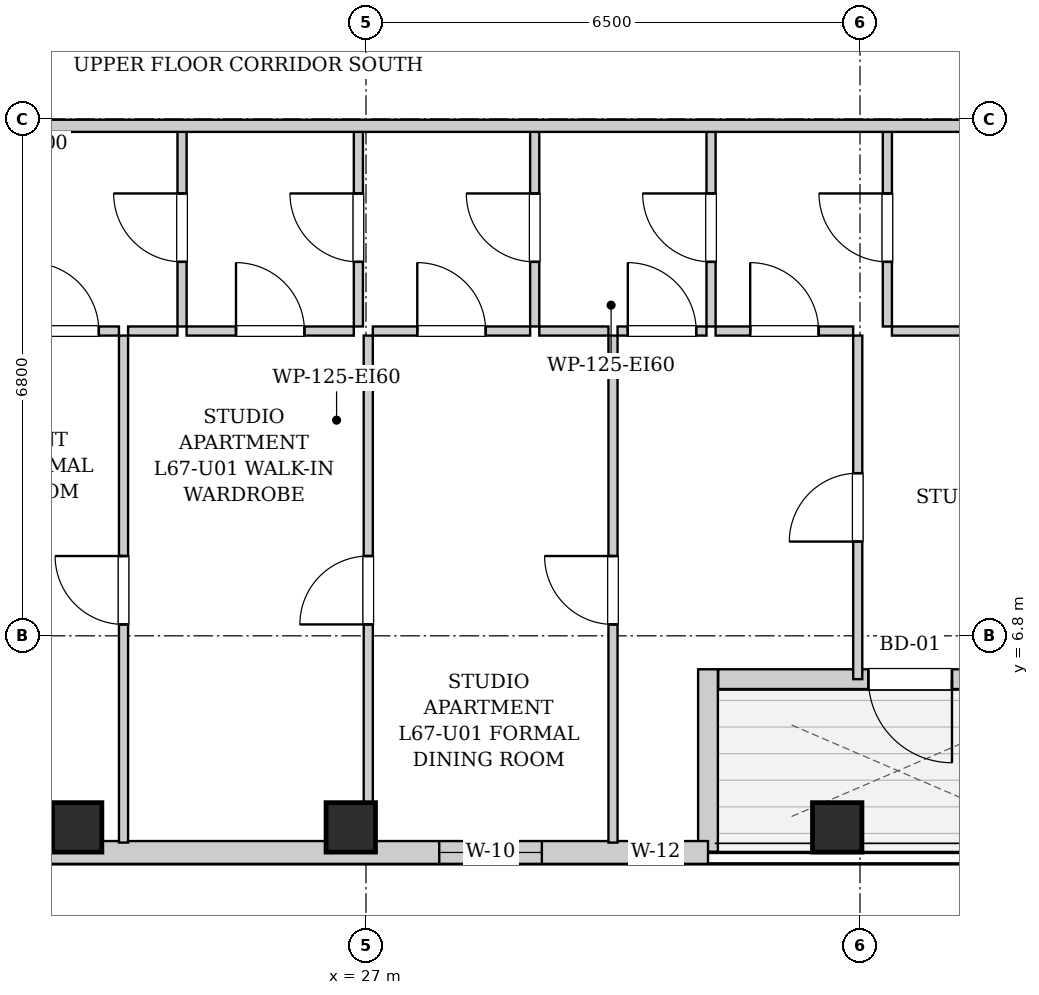
"""IFC4 building model, lengths in metres.
Left out: names, types, materials, properties, quantities, classifications, styles, units other than length and angle.
Written with IfcOpenShell. Run it as: python <this file> out.ifc"""

import sys

from ifc_helpers import new_model, si_unit, direction, frame, frame_2d, origin, origin_2d, place, context, subcontext, project, spatial, rectangle, extrude, element, fill, save


model = new_model("IFC4")
c1 = context("Model", 3, precision=1e-05, world=origin(), true_north=direction((0.0, 1.0)))
c2 = subcontext(c1, "Body", "Model", "MODEL_VIEW")
j1 = project(units=[si_unit("LENGTHUNIT", "METRE"), si_unit("PLANEANGLEUNIT", "RADIAN")], contexts=[c1])
p1 = place(None, origin())
s1 = spatial("IfcSite", under=j1, at=p1, CompositionType="ELEMENT")
p2 = place(p1, origin())
s2 = spatial("IfcBuilding", under=s1, at=p2, CompositionType="ELEMENT")
p3 = place(p2, frame((0.0, 0.0, 230.9)))
s3 = spatial("IfcBuildingStorey", under=s2, at=p3, CompositionType="ELEMENT", Elevation=230.9)
for number, where, z_axis, x_axis in (
    (1, (23.2, 4.28, 0.0), (0.0, 0.0, 1.0), (1.0, 0.0, 0.0)),
    (2, (26.8, 4.28, 0.0), (0.0, 0.0, 1.0), (1.0, 0.0, 0.0)),
    (3, (33.2, 4.28, 0.0), (0.0, 0.0, 1.0), (1.0, 0.0, 0.0)),
):
    element("IfcColumn", number, at=place(p3, frame(where, z_axis=z_axis, x_axis=x_axis)), inside=s3, PredefinedType="COLUMN", context=c2, shape_type="SweptSolid", body=[
        extrude(rectangle(XDim=0.65, YDim=0.65, at=origin_2d()), origin(), (0.0, 0.0, 1.0), 3.4),
    ])
p4 = place(p3, frame((36.366, 6.23, 0.0), z_axis=(0.0, 0.0, 1.0), x_axis=(-1.0, 0.0, 0.0)))
e4 = element("IfcWall", 4, at=p4, inside=s3, PredefinedType="SOLIDWALL", context=c2, shape_type="SweptSolid", body=[
    extrude(rectangle(XDim=4.732, YDim=0.26, at=frame_2d((2.366, 0.0))), origin(), (0.0, 0.0, 1.0), 3.14),
])
p5 = place(p4, frame((1.656, 0.0, 0.0)))
e5 = element("IfcOpeningElement", 5, at=p5, cuts=e4, PredefinedType="OPENING", context=c2, shape_type="SweptSolid", body=[
    extrude(rectangle(XDim=1.1, YDim=2.0, at=frame_2d((0.55, 1.0))), frame((0.0, 0.14, 0.0), z_axis=(0.0, -1.0, 0.0), x_axis=(1.0, 0.0, 0.0)), (0.0, 0.0, 1.0), 0.28),
])
p6 = place(p3, frame((31.5, 6.36, 0.0), z_axis=(0.0, 0.0, 1.0), x_axis=(0.0, -1.0, 0.0)))
e6 = element("IfcWall", 6, at=p6, inside=s3, PredefinedType="SOLIDWALL", context=c2, shape_type="SweptSolid", body=[
    extrude(rectangle(XDim=2.4, YDim=0.26, at=frame_2d((1.2, 0.0))), origin(), (0.0, 0.0, 1.0), 3.14),
])
p7 = place(p3, frame((31.5, 3.95, 0.0), z_axis=(0.0, 0.0, 1.0), x_axis=(-1.0, 0.0, 0.0)))
e7 = element("IfcWall", 7, at=p7, inside=s3, PredefinedType="SOLIDWALL", context=c2, shape_type="SweptSolid", body=[
    extrude(rectangle(XDim=12.5, YDim=0.3, at=frame_2d((6.25, 0.0))), origin(), (0.0, 0.0, 1.0), 3.14),
])
p8 = place(p7, frame((11.171, 0.0, 0.55)))
e8 = element("IfcOpeningElement", 8, at=p8, cuts=e7, PredefinedType="OPENING", context=c2, shape_type="SweptSolid", body=[
    extrude(rectangle(XDim=0.85, YDim=1.2, at=frame_2d((0.425, 0.6))), frame((0.0, 0.16, 0.0), z_axis=(0.0, -1.0, 0.0), x_axis=(1.0, 0.0, 0.0)), (0.0, 0.0, 1.0), 0.32),
])
p9 = place(p7, frame((9.0, 0.0, 0.55)))
e9 = element("IfcOpeningElement", 9, at=p9, cuts=e7, PredefinedType="OPENING", context=c2, shape_type="SweptSolid", body=[
    extrude(rectangle(XDim=1.35, YDim=1.2, at=frame_2d((0.675, 0.6))), frame((0.0, 0.16, 0.0), z_axis=(0.0, -1.0, 0.0), x_axis=(1.0, 0.0, 0.0)), (0.0, 0.0, 1.0), 0.32),
])
p10 = place(p7, frame((2.186, 0.0, 0.55)))
e10 = element("IfcOpeningElement", 10, at=p10, cuts=e7, PredefinedType="OPENING", context=c2, shape_type="SweptSolid", body=[
    extrude(rectangle(XDim=1.35, YDim=1.2, at=frame_2d((0.675, 0.6))), frame((0.0, 0.16, 0.0), z_axis=(0.0, -1.0, 0.0), x_axis=(1.0, 0.0, 0.0)), (0.0, 0.0, 1.0), 0.32),
])
p11 = place(p7, frame((0.35, 0.0, 0.55)))
e11 = element("IfcOpeningElement", 11, at=p11, cuts=e7, PredefinedType="OPENING", context=c2, shape_type="SweptSolid", body=[
    extrude(rectangle(XDim=0.68, YDim=1.2, at=frame_2d((0.34, 0.6))), frame((0.0, 0.16, 0.0), z_axis=(0.0, -1.0, 0.0), x_axis=(1.0, 0.0, 0.0)), (0.0, 0.0, 1.0), 0.32),
])
p12 = place(p3, frame((24.58, 10.87, 0.0), z_axis=(0.0, 0.0, 1.0), x_axis=(0.0, 1.0, 0.0)))
e12 = element("IfcWall", 12, at=p12, inside=s3, PredefinedType="PARTITIONING", context=c2, shape_type="SweptSolid", body=[
    extrude(rectangle(XDim=2.6, YDim=0.12, at=frame_2d((1.3, 0.0))), origin(), (0.0, 0.0, 1.0), 3.14),
])
p13 = place(p12, frame((0.85, 0.0, 0.0)))
e13 = element("IfcOpeningElement", 13, at=p13, cuts=e12, PredefinedType="OPENING", context=c2, shape_type="SweptSolid", body=[
    extrude(rectangle(XDim=0.9, YDim=2.05, at=frame_2d((0.45, 1.025))), frame((0.0, 0.07, 0.0), z_axis=(0.0, -1.0, 0.0), x_axis=(1.0, 0.0, 0.0)), (0.0, 0.0, 1.0), 0.14),
])
p14 = place(p3, frame((22.32, 10.81, 0.0), z_axis=(0.0, 0.0, 1.0), x_axis=(1.0, 0.0, 0.0)))
e14 = element("IfcWall", 14, at=p14, inside=s3, PredefinedType="PARTITIONING", context=c2, shape_type="SweptSolid", body=[
    extrude(rectangle(XDim=1.43, YDim=0.12, at=frame_2d((0.715, 0.0))), origin(), (0.0, 0.0, 1.0), 3.14),
])
p15 = place(p14, frame((0.265, 0.0, 0.0)))
e15 = element("IfcOpeningElement", 15, at=p15, cuts=e14, PredefinedType="OPENING", context=c2, shape_type="SweptSolid", body=[
    extrude(rectangle(XDim=0.9, YDim=2.05, at=frame_2d((0.45, 1.025))), frame((0.0, 0.07, 0.0), z_axis=(0.0, -1.0, 0.0), x_axis=(1.0, 0.0, 0.0)), (0.0, 0.0, 1.0), 0.14),
])
p16 = place(p3, frame((23.87, 10.81, 0.0), z_axis=(0.0, 0.0, 1.0), x_axis=(1.0, 0.0, 0.0)))
e16 = element("IfcWall", 16, at=p16, inside=s3, PredefinedType="PARTITIONING", context=c2, shape_type="SweptSolid", body=[
    extrude(rectangle(XDim=0.65, YDim=0.12, at=frame_2d((0.325, 0.0))), origin(), (0.0, 0.0, 1.0), 3.14),
])
p17 = place(p3, frame((26.9, 10.87, 0.0), z_axis=(0.0, 0.0, 1.0), x_axis=(0.0, 1.0, 0.0)))
e17 = element("IfcWall", 17, at=p17, inside=s3, PredefinedType="PARTITIONING", context=c2, shape_type="SweptSolid", body=[
    extrude(rectangle(XDim=2.6, YDim=0.12, at=frame_2d((1.3, 0.0))), origin(), (0.0, 0.0, 1.0), 3.14),
])
p18 = place(p17, frame((0.85, 0.0, 0.0)))
e18 = element("IfcOpeningElement", 18, at=p18, cuts=e17, PredefinedType="OPENING", context=c2, shape_type="SweptSolid", body=[
    extrude(rectangle(XDim=0.9, YDim=2.05, at=frame_2d((0.45, 1.025))), frame((0.0, 0.07, 0.0), z_axis=(0.0, -1.0, 0.0), x_axis=(1.0, 0.0, 0.0)), (0.0, 0.0, 1.0), 0.14),
])
p19 = place(p3, frame((24.64, 10.81, 0.0), z_axis=(0.0, 0.0, 1.0), x_axis=(1.0, 0.0, 0.0)))
e19 = element("IfcWall", 19, at=p19, inside=s3, PredefinedType="PARTITIONING", context=c2, shape_type="SweptSolid", body=[
    extrude(rectangle(XDim=2.2, YDim=0.12, at=frame_2d((1.1, 0.0))), origin(), (0.0, 0.0, 1.0), 3.14),
])
p20 = place(p19, frame((0.65, 0.0, 0.0)))
e20 = element("IfcOpeningElement", 20, at=p20, cuts=e19, PredefinedType="OPENING", context=c2, shape_type="SweptSolid", body=[
    extrude(rectangle(XDim=0.9, YDim=2.05, at=frame_2d((0.45, 1.025))), frame((0.0, 0.07, 0.0), z_axis=(0.0, -1.0, 0.0), x_axis=(1.0, 0.0, 0.0)), (0.0, 0.0, 1.0), 0.14),
])
p21 = place(p3, frame((29.22, 10.87, 0.0), z_axis=(0.0, 0.0, 1.0), x_axis=(0.0, 1.0, 0.0)))
e21 = element("IfcWall", 21, at=p21, inside=s3, PredefinedType="PARTITIONING", context=c2, shape_type="SweptSolid", body=[
    extrude(rectangle(XDim=2.6, YDim=0.12, at=frame_2d((1.3, 0.0))), origin(), (0.0, 0.0, 1.0), 3.14),
])
p22 = place(p21, frame((0.85, 0.0, 0.0)))
e22 = element("IfcOpeningElement", 22, at=p22, cuts=e21, PredefinedType="OPENING", context=c2, shape_type="SweptSolid", body=[
    extrude(rectangle(XDim=0.9, YDim=2.05, at=frame_2d((0.45, 1.025))), frame((0.0, 0.07, 0.0), z_axis=(0.0, -1.0, 0.0), x_axis=(1.0, 0.0, 0.0)), (0.0, 0.0, 1.0), 0.14),
])
p23 = place(p3, frame((27.09, 10.81, 0.0), z_axis=(0.0, 0.0, 1.0), x_axis=(1.0, 0.0, 0.0)))
e23 = element("IfcWall", 23, at=p23, inside=s3, PredefinedType="PARTITIONING", context=c2, shape_type="SweptSolid", body=[
    extrude(rectangle(XDim=2.07, YDim=0.12, at=frame_2d((1.035, 0.0))), origin(), (0.0, 0.0, 1.0), 3.14),
])
p24 = place(p23, frame((0.585, 0.0, 0.0)))
e24 = element("IfcOpeningElement", 24, at=p24, cuts=e23, PredefinedType="OPENING", context=c2, shape_type="SweptSolid", body=[
    extrude(rectangle(XDim=0.9, YDim=2.05, at=frame_2d((0.45, 1.025))), frame((0.0, 0.07, 0.0), z_axis=(0.0, -1.0, 0.0), x_axis=(1.0, 0.0, 0.0)), (0.0, 0.0, 1.0), 0.14),
])
p25 = place(p3, frame((31.54, 10.87, 0.0), z_axis=(0.0, 0.0, 1.0), x_axis=(0.0, 1.0, 0.0)))
e25 = element("IfcWall", 25, at=p25, inside=s3, PredefinedType="PARTITIONING", context=c2, shape_type="SweptSolid", body=[
    extrude(rectangle(XDim=2.6, YDim=0.12, at=frame_2d((1.3, 0.0))), origin(), (0.0, 0.0, 1.0), 3.14),
])
p26 = place(p25, frame((0.85, 0.0, 0.0)))
e26 = element("IfcOpeningElement", 26, at=p26, cuts=e25, PredefinedType="OPENING", context=c2, shape_type="SweptSolid", body=[
    extrude(rectangle(XDim=0.9, YDim=2.05, at=frame_2d((0.45, 1.025))), frame((0.0, 0.07, 0.0), z_axis=(0.0, -1.0, 0.0), x_axis=(1.0, 0.0, 0.0)), (0.0, 0.0, 1.0), 0.14),
])
p27 = place(p3, frame((29.28, 10.81, 0.0), z_axis=(0.0, 0.0, 1.0), x_axis=(1.0, 0.0, 0.0)))
e27 = element("IfcWall", 27, at=p27, inside=s3, PredefinedType="PARTITIONING", context=c2, shape_type="SweptSolid", body=[
    extrude(rectangle(XDim=0.91, YDim=0.12, at=frame_2d((0.455, 0.0))), origin(), (0.0, 0.0, 1.0), 3.14),
])
p28 = place(p3, frame((30.31, 10.81, 0.0), z_axis=(0.0, 0.0, 1.0), x_axis=(1.0, 0.0, 0.0)))
e28 = element("IfcWall", 28, at=p28, inside=s3, PredefinedType="PARTITIONING", context=c2, shape_type="SweptSolid", body=[
    extrude(rectangle(XDim=1.17, YDim=0.12, at=frame_2d((0.585, 0.0))), origin(), (0.0, 0.0, 1.0), 3.14),
])
p29 = place(p28, frame((0.135, 0.0, 0.0)))
e29 = element("IfcOpeningElement", 29, at=p29, cuts=e28, PredefinedType="OPENING", context=c2, shape_type="SweptSolid", body=[
    extrude(rectangle(XDim=0.9, YDim=2.05, at=frame_2d((0.45, 1.025))), frame((0.0, 0.07, 0.0), z_axis=(0.0, -1.0, 0.0), x_axis=(1.0, 0.0, 0.0)), (0.0, 0.0, 1.0), 0.14),
])
p30 = place(p3, frame((33.86, 10.87, 0.0), z_axis=(0.0, 0.0, 1.0), x_axis=(0.0, 1.0, 0.0)))
e30 = element("IfcWall", 30, at=p30, inside=s3, PredefinedType="PARTITIONING", context=c2, shape_type="SweptSolid", body=[
    extrude(rectangle(XDim=2.6, YDim=0.12, at=frame_2d((1.3, 0.0))), origin(), (0.0, 0.0, 1.0), 3.14),
])
p31 = place(p30, frame((0.85, 0.0, 0.0)))
e31 = element("IfcOpeningElement", 31, at=p31, cuts=e30, PredefinedType="OPENING", context=c2, shape_type="SweptSolid", body=[
    extrude(rectangle(XDim=0.9, YDim=2.05, at=frame_2d((0.45, 1.025))), frame((0.0, 0.07, 0.0), z_axis=(0.0, -1.0, 0.0), x_axis=(1.0, 0.0, 0.0)), (0.0, 0.0, 1.0), 0.14),
])
p32 = place(p3, frame((31.6, 10.81, 0.0), z_axis=(0.0, 0.0, 1.0), x_axis=(1.0, 0.0, 0.0)))
e32 = element("IfcWall", 32, at=p32, inside=s3, PredefinedType="PARTITIONING", context=c2, shape_type="SweptSolid", body=[
    extrude(rectangle(XDim=1.81, YDim=0.12, at=frame_2d((0.905, 0.0))), origin(), (0.0, 0.0, 1.0), 3.14),
])
p33 = place(p32, frame((0.455, 0.0, 0.0)))
e33 = element("IfcOpeningElement", 33, at=p33, cuts=e32, PredefinedType="OPENING", context=c2, shape_type="SweptSolid", body=[
    extrude(rectangle(XDim=0.9, YDim=2.05, at=frame_2d((0.45, 1.025))), frame((0.0, 0.07, 0.0), z_axis=(0.0, -1.0, 0.0), x_axis=(1.0, 0.0, 0.0)), (0.0, 0.0, 1.0), 0.14),
])
p34 = place(p3, frame((33.92, 10.81, 0.0), z_axis=(0.0, 0.0, 1.0), x_axis=(1.0, 0.0, 0.0)))
e34 = element("IfcWall", 34, at=p34, inside=s3, PredefinedType="PARTITIONING", context=c2, shape_type="SweptSolid", body=[
    extrude(rectangle(XDim=3.8, YDim=0.12, at=frame_2d((1.9, 0.0))), origin(), (0.0, 0.0, 1.0), 3.14),
])
p35 = place(p34, frame((1.45, 0.0, 0.0)))
e35 = element("IfcOpeningElement", 35, at=p35, cuts=e34, PredefinedType="OPENING", context=c2, shape_type="SweptSolid", body=[
    extrude(rectangle(XDim=0.9, YDim=2.05, at=frame_2d((0.45, 1.025))), frame((0.0, 0.07, 0.0), z_axis=(0.0, -1.0, 0.0), x_axis=(1.0, 0.0, 0.0)), (0.0, 0.0, 1.0), 0.14),
])
p36 = place(p3, frame((23.81, 4.08, 0.0), z_axis=(0.0, 0.0, 1.0), x_axis=(0.0, 1.0, 0.0)))
e36 = element("IfcWall", 36, at=p36, inside=s3, PredefinedType="PARTITIONING", context=c2, shape_type="SweptSolid", body=[
    extrude(rectangle(XDim=6.67, YDim=0.12, at=frame_2d((3.335, 0.0))), origin(), (0.0, 0.0, 1.0), 3.14),
])
p37 = place(p36, frame((2.87, 0.0, 0.0)))
e37 = element("IfcOpeningElement", 37, at=p37, cuts=e36, PredefinedType="OPENING", context=c2, shape_type="SweptSolid", body=[
    extrude(rectangle(XDim=0.9, YDim=2.05, at=frame_2d((0.45, 1.025))), frame((0.0, 0.07, 0.0), z_axis=(0.0, -1.0, 0.0), x_axis=(1.0, 0.0, 0.0)), (0.0, 0.0, 1.0), 0.14),
])
p38 = place(p3, frame((27.03, 4.08, 0.0), z_axis=(0.0, 0.0, 1.0), x_axis=(0.0, 1.0, 0.0)))
e38 = element("IfcWall", 38, at=p38, inside=s3, PredefinedType="PARTITIONING", context=c2, shape_type="SweptSolid", body=[
    extrude(rectangle(XDim=6.67, YDim=0.12, at=frame_2d((3.335, 0.0))), origin(), (0.0, 0.0, 1.0), 3.14),
])
p39 = place(p38, frame((2.87, 0.0, 0.0)))
e39 = element("IfcOpeningElement", 39, at=p39, cuts=e38, PredefinedType="OPENING", context=c2, shape_type="SweptSolid", body=[
    extrude(rectangle(XDim=0.9, YDim=2.05, at=frame_2d((0.45, 1.025))), frame((0.0, 0.07, 0.0), z_axis=(0.0, -1.0, 0.0), x_axis=(1.0, 0.0, 0.0)), (0.0, 0.0, 1.0), 0.14),
])
p40 = place(p3, frame((30.25, 4.08, 0.0), z_axis=(0.0, 0.0, 1.0), x_axis=(0.0, 1.0, 0.0)))
e40 = element("IfcWall", 40, at=p40, inside=s3, PredefinedType="PARTITIONING", context=c2, shape_type="SweptSolid", body=[
    extrude(rectangle(XDim=6.67, YDim=0.12, at=frame_2d((3.335, 0.0))), origin(), (0.0, 0.0, 1.0), 3.14),
])
p41 = place(p40, frame((2.87, 0.0, 0.0)))
e41 = element("IfcOpeningElement", 41, at=p41, cuts=e40, PredefinedType="OPENING", context=c2, shape_type="SweptSolid", body=[
    extrude(rectangle(XDim=0.9, YDim=2.05, at=frame_2d((0.45, 1.025))), frame((0.0, 0.07, 0.0), z_axis=(0.0, -1.0, 0.0), x_axis=(1.0, 0.0, 0.0)), (0.0, 0.0, 1.0), 0.14),
])
p42 = place(p3, frame((33.47, 6.23, 0.0), z_axis=(0.0, 0.0, 1.0), x_axis=(0.0, 1.0, 0.0)))
e42 = element("IfcWall", 42, at=p42, inside=s3, PredefinedType="PARTITIONING", context=c2, shape_type="SweptSolid", body=[
    extrude(rectangle(XDim=4.52, YDim=0.12, at=frame_2d((2.26, 0.0))), origin(), (0.0, 0.0, 1.0), 3.14),
])
p43 = place(p42, frame((1.81, 0.0, 0.0)))
e43 = element("IfcOpeningElement", 43, at=p43, cuts=e42, PredefinedType="OPENING", context=c2, shape_type="SweptSolid", body=[
    extrude(rectangle(XDim=0.9, YDim=2.05, at=frame_2d((0.45, 1.025))), frame((0.0, 0.07, 0.0), z_axis=(0.0, -1.0, 0.0), x_axis=(1.0, 0.0, 0.0)), (0.0, 0.0, 1.0), 0.14),
])
p44 = place(p3, frame((13.15, 13.51, 0.0), z_axis=(0.0, 0.0, 1.0), x_axis=(1.0, 0.0, 0.0)))
e44 = element("IfcWall", 44, at=p44, inside=s3, PredefinedType="PARTITIONING", context=c2, shape_type="SweptSolid", body=[
    extrude(rectangle(XDim=24.6, YDim=0.16, at=frame_2d((12.3, 0.0))), origin(), (0.0, 0.0, 1.0), 3.14),
])
p45 = place(p44, frame((3.165, 0.0, 0.0)))
e45 = element("IfcOpeningElement", 45, at=p45, cuts=e44, PredefinedType="OPENING", context=c2, shape_type="SweptSolid", body=[
    extrude(rectangle(XDim=0.95, YDim=2.1, at=frame_2d((0.475, 1.05))), frame((0.0, 0.09, 0.0), z_axis=(0.0, -1.0, 0.0), x_axis=(1.0, 0.0, 0.0)), (0.0, 0.0, 1.0), 0.18),
])
p46 = place(p13, origin())
e46 = element("IfcDoor", 46, at=p46, inside=s3, OperationType="SINGLE_SWING_RIGHT", PredefinedType="DOOR", context=c2, shape_type="SweptSolid", body=[
    extrude(rectangle(XDim=0.9, YDim=2.05, at=frame_2d((0.45, 1.025))), frame((0.0, 0.025, 0.0), z_axis=(0.0, -1.0, 0.0), x_axis=(1.0, 0.0, 0.0)), (0.0, 0.0, 1.0), 0.05),
])
fill(e13, e46)
p47 = place(p15, origin())
e47 = element("IfcDoor", 47, at=p47, inside=s3, OperationType="SINGLE_SWING_LEFT", PredefinedType="DOOR", context=c2, shape_type="SweptSolid", body=[
    extrude(rectangle(XDim=0.9, YDim=2.05, at=frame_2d((0.45, 1.025))), frame((0.0, 0.025, 0.0), z_axis=(0.0, -1.0, 0.0), x_axis=(1.0, 0.0, 0.0)), (0.0, 0.0, 1.0), 0.05),
])
fill(e15, e47)
p48 = place(p18, origin())
e48 = element("IfcDoor", 48, at=p48, inside=s3, OperationType="SINGLE_SWING_RIGHT", PredefinedType="DOOR", context=c2, shape_type="SweptSolid", body=[
    extrude(rectangle(XDim=0.9, YDim=2.05, at=frame_2d((0.45, 1.025))), frame((0.0, 0.025, 0.0), z_axis=(0.0, -1.0, 0.0), x_axis=(1.0, 0.0, 0.0)), (0.0, 0.0, 1.0), 0.05),
])
fill(e18, e48)
p49 = place(p20, origin())
e49 = element("IfcDoor", 49, at=p49, inside=s3, OperationType="SINGLE_SWING_LEFT", PredefinedType="DOOR", context=c2, shape_type="SweptSolid", body=[
    extrude(rectangle(XDim=0.9, YDim=2.05, at=frame_2d((0.45, 1.025))), frame((0.0, 0.025, 0.0), z_axis=(0.0, -1.0, 0.0), x_axis=(1.0, 0.0, 0.0)), (0.0, 0.0, 1.0), 0.05),
])
fill(e20, e49)
p50 = place(p22, origin())
e50 = element("IfcDoor", 50, at=p50, inside=s3, OperationType="SINGLE_SWING_RIGHT", PredefinedType="DOOR", context=c2, shape_type="SweptSolid", body=[
    extrude(rectangle(XDim=0.9, YDim=2.05, at=frame_2d((0.45, 1.025))), frame((0.0, 0.025, 0.0), z_axis=(0.0, -1.0, 0.0), x_axis=(1.0, 0.0, 0.0)), (0.0, 0.0, 1.0), 0.05),
])
fill(e22, e50)
p51 = place(p24, origin())
e51 = element("IfcDoor", 51, at=p51, inside=s3, OperationType="SINGLE_SWING_LEFT", PredefinedType="DOOR", context=c2, shape_type="SweptSolid", body=[
    extrude(rectangle(XDim=0.9, YDim=2.05, at=frame_2d((0.45, 1.025))), frame((0.0, 0.025, 0.0), z_axis=(0.0, -1.0, 0.0), x_axis=(1.0, 0.0, 0.0)), (0.0, 0.0, 1.0), 0.05),
])
fill(e24, e51)
p52 = place(p26, origin())
e52 = element("IfcDoor", 52, at=p52, inside=s3, OperationType="SINGLE_SWING_RIGHT", PredefinedType="DOOR", context=c2, shape_type="SweptSolid", body=[
    extrude(rectangle(XDim=0.9, YDim=2.05, at=frame_2d((0.45, 1.025))), frame((0.0, 0.025, 0.0), z_axis=(0.0, -1.0, 0.0), x_axis=(1.0, 0.0, 0.0)), (0.0, 0.0, 1.0), 0.05),
])
fill(e26, e52)
p53 = place(p29, origin())
e53 = element("IfcDoor", 53, at=p53, inside=s3, OperationType="SINGLE_SWING_LEFT", PredefinedType="DOOR", context=c2, shape_type="SweptSolid", body=[
    extrude(rectangle(XDim=0.9, YDim=2.05, at=frame_2d((0.45, 1.025))), frame((0.0, 0.025, 0.0), z_axis=(0.0, -1.0, 0.0), x_axis=(1.0, 0.0, 0.0)), (0.0, 0.0, 1.0), 0.05),
])
fill(e29, e53)
p54 = place(p31, origin())
e54 = element("IfcDoor", 54, at=p54, inside=s3, OperationType="SINGLE_SWING_RIGHT", PredefinedType="DOOR", context=c2, shape_type="SweptSolid", body=[
    extrude(rectangle(XDim=0.9, YDim=2.05, at=frame_2d((0.45, 1.025))), frame((0.0, 0.025, 0.0), z_axis=(0.0, -1.0, 0.0), x_axis=(1.0, 0.0, 0.0)), (0.0, 0.0, 1.0), 0.05),
])
fill(e31, e54)
p55 = place(p33, origin())
e55 = element("IfcDoor", 55, at=p55, inside=s3, OperationType="SINGLE_SWING_LEFT", PredefinedType="DOOR", context=c2, shape_type="SweptSolid", body=[
    extrude(rectangle(XDim=0.9, YDim=2.05, at=frame_2d((0.45, 1.025))), frame((0.0, 0.025, 0.0), z_axis=(0.0, -1.0, 0.0), x_axis=(1.0, 0.0, 0.0)), (0.0, 0.0, 1.0), 0.05),
])
fill(e33, e55)
p56 = place(p37, origin())
e56 = element("IfcDoor", 56, at=p56, inside=s3, OperationType="SINGLE_SWING_RIGHT", PredefinedType="DOOR", context=c2, shape_type="SweptSolid", body=[
    extrude(rectangle(XDim=0.9, YDim=2.05, at=frame_2d((0.45, 1.025))), frame((0.0, 0.025, 0.0), z_axis=(0.0, -1.0, 0.0), x_axis=(1.0, 0.0, 0.0)), (0.0, 0.0, 1.0), 0.05),
])
fill(e37, e56)
p57 = place(p39, origin())
e57 = element("IfcDoor", 57, at=p57, inside=s3, OperationType="SINGLE_SWING_LEFT", PredefinedType="DOOR", context=c2, shape_type="SweptSolid", body=[
    extrude(rectangle(XDim=0.9, YDim=2.05, at=frame_2d((0.45, 1.025))), frame((0.0, 0.025, 0.0), z_axis=(0.0, -1.0, 0.0), x_axis=(1.0, 0.0, 0.0)), (0.0, 0.0, 1.0), 0.05),
])
fill(e39, e57)
p58 = place(p41, origin())
e58 = element("IfcDoor", 58, at=p58, inside=s3, OperationType="SINGLE_SWING_RIGHT", PredefinedType="DOOR", context=c2, shape_type="SweptSolid", body=[
    extrude(rectangle(XDim=0.9, YDim=2.05, at=frame_2d((0.45, 1.025))), frame((0.0, 0.025, 0.0), z_axis=(0.0, -1.0, 0.0), x_axis=(1.0, 0.0, 0.0)), (0.0, 0.0, 1.0), 0.05),
])
fill(e41, e58)
p59 = place(p43, origin())
e59 = element("IfcDoor", 59, at=p59, inside=s3, OperationType="SINGLE_SWING_LEFT", PredefinedType="DOOR", context=c2, shape_type="SweptSolid", body=[
    extrude(rectangle(XDim=0.9, YDim=2.05, at=frame_2d((0.45, 1.025))), frame((0.0, 0.025, 0.0), z_axis=(0.0, -1.0, 0.0), x_axis=(1.0, 0.0, 0.0)), (0.0, 0.0, 1.0), 0.05),
])
fill(e43, e59)
p60 = place(p5, origin())
e60 = element("IfcDoor", 60, at=p60, inside=s3, OperationType="SINGLE_SWING_LEFT", PredefinedType="DOOR", context=c2, shape_type="SweptSolid", body=[
    extrude(rectangle(XDim=1.1, YDim=2.0, at=frame_2d((0.55, 1.0))), frame((0.0, 0.025, 0.0), z_axis=(0.0, -1.0, 0.0), x_axis=(1.0, 0.0, 0.0)), (0.0, 0.0, 1.0), 0.05),
])
fill(e5, e60)
p61 = place(p10, origin())
e61 = element("IfcWindow", 61, at=p61, inside=s3, PartitioningType="SINGLE_PANEL", PredefinedType="WINDOW", context=c2, shape_type="SweptSolid", body=[
    extrude(rectangle(XDim=1.35, YDim=1.2, at=frame_2d((0.675, 0.6))), frame((0.0, 0.03, 0.0), z_axis=(0.0, -1.0, 0.0), x_axis=(1.0, 0.0, 0.0)), (0.0, 0.0, 1.0), 0.06),
])
fill(e10, e61)
p62 = place(p11, origin())
e62 = element("IfcWindow", 62, at=p62, inside=s3, PartitioningType="SINGLE_PANEL", PredefinedType="WINDOW", context=c2, shape_type="SweptSolid", body=[
    extrude(rectangle(XDim=0.68, YDim=1.2, at=frame_2d((0.34, 0.6))), frame((0.0, 0.03, 0.0), z_axis=(0.0, -1.0, 0.0), x_axis=(1.0, 0.0, 0.0)), (0.0, 0.0, 1.0), 0.06),
])
fill(e11, e62)
save(model, sys.argv[1])
